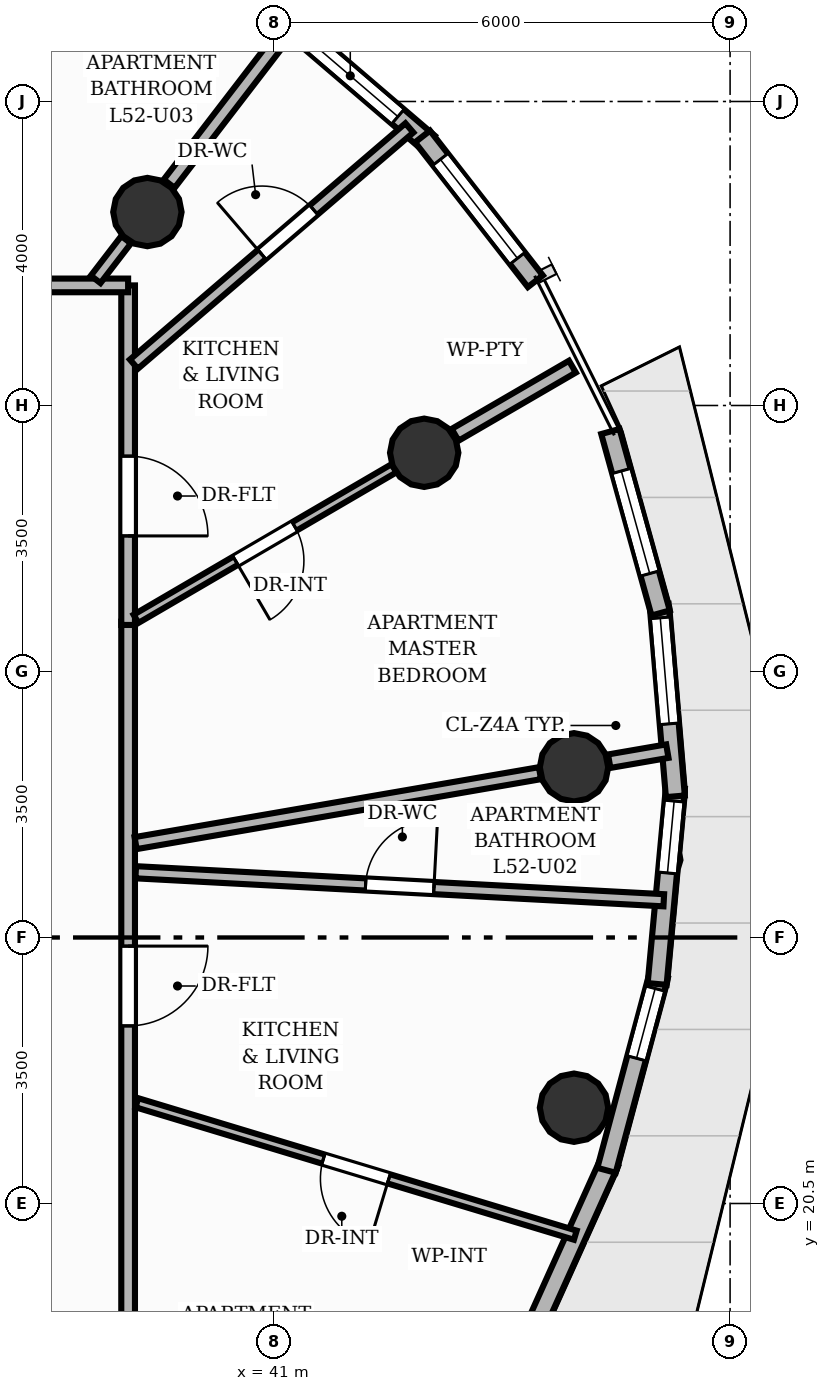
"""IFC4 building model, lengths in metres.
Left out: names, types, materials, properties, quantities, classifications, styles, units other than length and angle.
Written with IfcOpenShell. Run it as: python <this file> out.ifc"""

import sys

from ifc_helpers import new_model, si_unit, direction, frame, frame_2d, origin, origin_2d, place, context, subcontext, project, spatial, rectangle, circle, extrude, element, fill, save


model = new_model("IFC4")
c1 = context("Model", 3, precision=1e-05, world=origin(), true_north=direction((0.0, 1.0)))
c2 = subcontext(c1, "Body", "Model", "MODEL_VIEW")
j1 = project(units=[si_unit("LENGTHUNIT", "METRE"), si_unit("PLANEANGLEUNIT", "RADIAN")], contexts=[c1])
p1 = place(None, origin())
s1 = spatial("IfcSite", under=j1, at=p1, CompositionType="ELEMENT")
p2 = place(p1, origin())
s2 = spatial("IfcBuilding", under=s1, at=p2, CompositionType="ELEMENT")
p3 = place(p2, frame((0.0, 0.0, 175.84)))
s3 = spatial("IfcBuildingStorey", under=s2, at=p3, CompositionType="ELEMENT", Elevation=175.84)
for number, where, z_axis, x_axis in (
    (1, (44.946, 26.24, 0.0), (0.0, 0.0, 1.0), (1.0, 0.0, 0.0)),
    (2, (42.975, 30.378, 0.0), (0.0, 0.0, 1.0), (1.0, 0.0, 0.0)),
    (3, (39.333, 33.545, 0.0), (0.0, 0.0, 1.0), (1.0, 0.0, 0.0)),
    (4, (44.946, 21.76, 0.0), (0.0, 0.0, 1.0), (1.0, 0.0, 0.0)),
):
    element("IfcColumn", number, at=place(p3, frame(where, z_axis=z_axis, x_axis=x_axis)), inside=s3, PredefinedType="COLUMN", context=c2, shape_type="SweptSolid", body=[
        extrude(circle(Radius=0.45, at=origin_2d()), origin(), (0.0, 0.0, 1.0), 3.2),
    ])
p4 = place(p3, frame((41.198, 36.027, 0.0), z_axis=(0.0, 0.0, 1.0), x_axis=(0.759591927835, -0.65039995631, 0.0)))
e5 = element("IfcWall", 5, at=p4, inside=s3, PredefinedType="SOLIDWALL", context=c2, shape_type="SweptSolid", body=[
    extrude(rectangle(XDim=2.415, YDim=0.25, at=frame_2d((1.208, 0.0))), origin(), (0.0, 0.0, 1.0), 2.96),
])
p5 = place(p4, frame((0.234, 0.0, 0.85)))
e6 = element("IfcOpeningElement", 6, at=p5, cuts=e5, PredefinedType="OPENING", context=c2, shape_type="SweptSolid", body=[
    extrude(rectangle(XDim=1.65, YDim=1.52, at=frame_2d((0.825, 0.76))), frame((0.0, 0.135, 0.0), z_axis=(0.0, -1.0, 0.0), x_axis=(1.0, 0.0, 0.0)), (0.0, 0.0, 1.0), 0.27),
])
p6 = place(p3, frame((45.411, 21.04, 0.0), z_axis=(0.0, 0.0, 1.0), x_axis=(-0.410736648959, -0.911754026699, 0.0)))
e7 = element("IfcWall", 7, at=p6, inside=s3, PredefinedType="SOLIDWALL", context=c2, shape_type="SweptSolid", body=[
    extrude(rectangle(XDim=2.701, YDim=0.25, at=frame_2d((1.351, 0.0))), origin(), (0.0, 0.0, 1.0), 2.96),
])
p7 = place(p3, frame((46.06, 23.497, 0.0), z_axis=(0.0, 0.0, 1.0), x_axis=(-0.258688517816, -0.965960791518, 0.0)))
e8 = element("IfcWall", 8, at=p7, inside=s3, PredefinedType="SOLIDWALL", context=c2, shape_type="SweptSolid", body=[
    extrude(rectangle(XDim=2.651, YDim=0.25, at=frame_2d((1.326, 0.0))), origin(), (0.0, 0.0, 1.0), 2.96),
])
p8 = place(p7, frame((0.175, 0.0, 0.85)))
e9 = element("IfcOpeningElement", 9, at=p8, cuts=e8, PredefinedType="OPENING", context=c2, shape_type="SweptSolid", body=[
    extrude(rectangle(XDim=0.95, YDim=1.45, at=frame_2d((0.475, 0.725))), frame((0.0, 0.135, 0.0), z_axis=(0.0, -1.0, 0.0), x_axis=(1.0, 0.0, 0.0)), (0.0, 0.0, 1.0), 0.27),
])
p9 = place(p3, frame((46.28, 25.969, 0.0), z_axis=(0.0, 0.0, 1.0), x_axis=(-0.092582110032, -0.995705053167, 0.0)))
e10 = element("IfcWall", 10, at=p9, inside=s3, PredefinedType="SOLIDWALL", context=c2, shape_type="SweptSolid", body=[
    extrude(rectangle(XDim=2.592, YDim=0.25, at=frame_2d((1.296, 0.0))), origin(), (0.0, 0.0, 1.0), 2.96),
])
p10 = place(p9, frame((0.175, 0.0, 0.85)))
e11 = element("IfcOpeningElement", 11, at=p10, cuts=e10, PredefinedType="OPENING", context=c2, shape_type="SweptSolid", body=[
    extrude(rectangle(XDim=0.95, YDim=1.45, at=frame_2d((0.475, 0.725))), frame((0.0, 0.135, 0.0), z_axis=(0.0, -1.0, 0.0), x_axis=(1.0, 0.0, 0.0)), (0.0, 0.0, 1.0), 0.27),
])
p11 = place(p3, frame((46.066, 28.381, 0.0), z_axis=(0.0, 0.0, 1.0), x_axis=(0.084274320236, -0.996442591898, 0.0)))
e12 = element("IfcWall", 12, at=p11, inside=s3, PredefinedType="SOLIDWALL", context=c2, shape_type="SweptSolid", body=[
    extrude(rectangle(XDim=2.532, YDim=0.25, at=frame_2d((1.266, 0.0))), origin(), (0.0, 0.0, 1.0), 2.96),
])
p12 = place(p11, frame((0.175, 0.0, 0.85)))
e13 = element("IfcOpeningElement", 13, at=p12, cuts=e12, PredefinedType="OPENING", context=c2, shape_type="SweptSolid", body=[
    extrude(rectangle(XDim=1.4, YDim=1.55, at=frame_2d((0.7, 0.775))), frame((0.0, 0.135, 0.0), z_axis=(0.0, -1.0, 0.0), x_axis=(1.0, 0.0, 0.0)), (0.0, 0.0, 1.0), 0.27),
])
p13 = place(p3, frame((45.425, 30.658, 0.0), z_axis=(0.0, 0.0, 1.0), x_axis=(0.266734060973, -0.96377017007, 0.0)))
e14 = element("IfcWall", 14, at=p13, inside=s3, PredefinedType="SOLIDWALL", context=c2, shape_type="SweptSolid", body=[
    extrude(rectangle(XDim=2.478, YDim=0.25, at=frame_2d((1.239, 0.0))), origin(), (0.0, 0.0, 1.0), 2.96),
])
p14 = place(p13, frame((0.539, 0.0, 0.85)))
e15 = element("IfcOpeningElement", 15, at=p14, cuts=e14, PredefinedType="OPENING", context=c2, shape_type="SweptSolid", body=[
    extrude(rectangle(XDim=1.4, YDim=1.55, at=frame_2d((0.7, 0.775))), frame((0.0, 0.135, 0.0), z_axis=(0.0, -1.0, 0.0), x_axis=(1.0, 0.0, 0.0)), (0.0, 0.0, 1.0), 0.27),
])
p15 = place(p3, frame((42.953, 34.539, 0.0), z_axis=(0.0, 0.0, 1.0), x_axis=(0.61468225386, -0.788774826417, 0.0)))
e16 = element("IfcWall", 16, at=p15, inside=s3, PredefinedType="SOLIDWALL", context=c2, shape_type="SweptSolid", body=[
    extrude(rectangle(XDim=2.415, YDim=0.25, at=frame_2d((1.208, 0.0))), origin(), (0.0, 0.0, 1.0), 2.96),
])
p16 = place(p15, frame((0.382, 0.0, 0.85)))
e17 = element("IfcOpeningElement", 17, at=p16, cuts=e16, PredefinedType="OPENING", context=c2, shape_type="SweptSolid", body=[
    extrude(rectangle(XDim=1.65, YDim=1.55, at=frame_2d((0.825, 0.775))), frame((0.0, 0.135, 0.0), z_axis=(0.0, -1.0, 0.0), x_axis=(1.0, 0.0, 0.0)), (0.0, 0.0, 1.0), 0.27),
])
p17 = place(p3, frame((45.409, 26.32, 0.0), z_axis=(0.0, 0.0, 1.0), x_axis=(0.985363715758, 0.170465092225, 0.0)))
e18 = element("IfcWall", 18, at=p17, inside=s3, PredefinedType="PARTITIONING", context=c2, shape_type="SweptSolid", body=[
    extrude(rectangle(XDim=0.776, YDim=0.18, at=frame_2d((0.388, 0.0))), origin(), (0.0, 0.0, 1.0), 2.403),
])
p18 = place(p3, frame((43.382, 30.614, 0.0), z_axis=(0.0, 0.0, 1.0), x_axis=(0.86456661279, 0.502518230563, 0.0)))
e19 = element("IfcWall", 19, at=p18, inside=s3, PredefinedType="PARTITIONING", context=c2, shape_type="SweptSolid", body=[
    extrude(rectangle(XDim=1.785, YDim=0.18, at=frame_2d((0.893, 0.0))), origin(), (0.0, 0.0, 1.0), 2.403),
])
p19 = place(p3, frame((39.62, 33.918, 0.0), z_axis=(0.0, 0.0, 1.0), x_axis=(0.609164681512, 0.793043750873, 0.0)))
e20 = element("IfcWall", 20, at=p19, inside=s3, PredefinedType="PARTITIONING", context=c2, shape_type="SweptSolid", body=[
    extrude(rectangle(XDim=2.572, YDim=0.18, at=frame_2d((1.286, 0.0))), origin(), (0.0, 0.0, 1.0), 2.403),
])
p20 = place(p3, frame((39.08, 28.156, 0.0), z_axis=(0.0, 0.0, 1.0), x_axis=(0.0, -1.0, 0.0)))
e21 = element("IfcWall", 21, at=p20, inside=s3, PredefinedType="PARTITIONING", context=c2, shape_type="SweptSolid", body=[
    extrude(rectangle(XDim=12.736, YDim=0.18, at=frame_2d((6.368, 0.0))), origin(), (0.0, 0.0, 1.0), 2.955),
])
p21 = place(p20, frame((4.269, 0.0, 0.0)))
e22 = element("IfcOpeningElement", 22, at=p21, cuts=e21, PredefinedType="OPENING", context=c2, shape_type="SweptSolid", body=[
    extrude(rectangle(XDim=1.05, YDim=2.15, at=frame_2d((0.525, 1.075))), frame((0.0, 0.1, 0.0), z_axis=(0.0, -1.0, 0.0), x_axis=(1.0, 0.0, 0.0)), (0.0, 0.0, 1.0), 0.2),
])
p22 = place(p3, frame((39.08, 32.58, 0.0), z_axis=(0.0, 0.0, 1.0), x_axis=(0.0, -1.0, 0.0)))
e23 = element("IfcWall", 23, at=p22, inside=s3, PredefinedType="PARTITIONING", context=c2, shape_type="SweptSolid", body=[
    extrude(rectangle(XDim=4.468, YDim=0.18, at=frame_2d((2.234, 0.0))), origin(), (0.0, 0.0, 1.0), 2.955),
])
p23 = place(p22, frame((2.246, 0.0, 0.0)))
e24 = element("IfcOpeningElement", 24, at=p23, cuts=e23, PredefinedType="OPENING", context=c2, shape_type="SweptSolid", body=[
    extrude(rectangle(XDim=1.05, YDim=2.15, at=frame_2d((0.525, 1.075))), frame((0.0, 0.1, 0.0), z_axis=(0.0, -1.0, 0.0), x_axis=(1.0, 0.0, 0.0)), (0.0, 0.0, 1.0), 0.2),
])
p24 = place(p3, frame((33.2, 32.58, 0.0), z_axis=(0.0, 0.0, 1.0), x_axis=(1.0, 0.0, 0.0)))
e25 = element("IfcWall", 25, at=p24, inside=s3, PredefinedType="PARTITIONING", context=c2, shape_type="SweptSolid", body=[
    extrude(rectangle(XDim=5.88, YDim=0.18, at=frame_2d((2.94, 0.0))), origin(), (0.0, 0.0, 1.0), 2.955),
])
p25 = place(p24, frame((2.184, 0.0, 0.0)))
e26 = element("IfcOpeningElement", 26, at=p25, cuts=e25, PredefinedType="OPENING", context=c2, shape_type="SweptSolid", body=[
    extrude(rectangle(XDim=1.05, YDim=2.15, at=frame_2d((0.525, 1.075))), frame((0.0, 0.1, 0.0), z_axis=(0.0, -1.0, 0.0), x_axis=(1.0, 0.0, 0.0)), (0.0, 0.0, 1.0), 0.2),
])
p26 = place(p3, frame((39.18, 24.858, 0.0), z_axis=(0.0, 0.0, 1.0), x_axis=(0.998597105279, -0.05295112207, 0.0)))
e27 = element("IfcWall", 27, at=p26, inside=s3, PredefinedType="PLUMBINGWALL", context=c2, shape_type="SweptSolid", body=[
    extrude(rectangle(XDim=6.958, YDim=0.16, at=frame_2d((3.479, 0.0))), origin(), (0.0, 0.0, 1.0), 2.692),
])
p27 = place(p26, frame((3.029, 0.0, 0.0)))
e28 = element("IfcOpeningElement", 28, at=p27, cuts=e27, PredefinedType="OPENING", context=c2, shape_type="SweptSolid", body=[
    extrude(rectangle(XDim=0.9, YDim=2.1, at=frame_2d((0.45, 1.05))), frame((0.0, 0.09, 0.0), z_axis=(0.0, -1.0, 0.0), x_axis=(1.0, 0.0, 0.0)), (0.0, 0.0, 1.0), 0.18),
])
p28 = place(p3, frame((44.963, 20.083, 0.0), z_axis=(0.0, 0.0, 1.0), x_axis=(-0.95726021897, 0.289228064298, 0.0)))
e29 = element("IfcWall", 29, at=p28, inside=s3, PredefinedType="PARTITIONING", context=c2, shape_type="SweptSolid", body=[
    extrude(rectangle(XDim=6.026, YDim=0.125, at=frame_2d((3.013, 0.0))), origin(), (0.0, 0.0, 1.0), 2.692),
])
p29 = place(p28, frame((2.563, 0.0, 0.0)))
e30 = element("IfcOpeningElement", 30, at=p29, cuts=e29, PredefinedType="OPENING", context=c2, shape_type="SweptSolid", body=[
    extrude(rectangle(XDim=0.9, YDim=2.1, at=frame_2d((0.45, 1.05))), frame((0.0, 0.073, 0.0), z_axis=(0.0, -1.0, 0.0), x_axis=(1.0, 0.0, 0.0)), (0.0, 0.0, 1.0), 0.145),
])
p30 = place(p3, frame((39.178, 25.242, 0.0), z_axis=(0.0, 0.0, 1.0), x_axis=(0.985362047777, 0.170474733611, 0.0)))
e31 = element("IfcWall", 31, at=p30, inside=s3, PredefinedType="PLUMBINGWALL", context=c2, shape_type="SweptSolid", body=[
    extrude(rectangle(XDim=5.399, YDim=0.16, at=frame_2d((2.7, 0.0))), origin(), (0.0, 0.0, 1.0), 2.403),
])
p31 = place(p3, frame((39.156, 31.544, 0.0), z_axis=(0.0, 0.0, 1.0), x_axis=(0.759083333315, 0.650993466238, 0.0)))
e32 = element("IfcWall", 32, at=p31, inside=s3, PredefinedType="PLUMBINGWALL", context=c2, shape_type="SweptSolid", body=[
    extrude(rectangle(XDim=4.775, YDim=0.16, at=frame_2d((2.387, 0.0))), origin(), (0.0, 0.0, 1.0), 2.955),
])
p32 = place(p31, frame((2.217, 0.0, 0.0)))
e33 = element("IfcOpeningElement", 33, at=p32, cuts=e32, PredefinedType="OPENING", context=c2, shape_type="SweptSolid", body=[
    extrude(rectangle(XDim=0.9, YDim=2.1, at=frame_2d((0.45, 1.05))), frame((0.0, 0.09, 0.0), z_axis=(0.0, -1.0, 0.0), x_axis=(1.0, 0.0, 0.0)), (0.0, 0.0, 1.0), 0.18),
])
p33 = place(p3, frame((42.58, 30.175, 0.0), z_axis=(0.0, 0.0, 1.0), x_axis=(-0.863675291667, -0.504048599407, 0.0)))
e34 = element("IfcWall", 34, at=p33, inside=s3, PredefinedType="PARTITIONING", context=c2, shape_type="SweptSolid", body=[
    extrude(rectangle(XDim=3.932, YDim=0.125, at=frame_2d((1.966, 0.0))), origin(), (0.0, 0.0, 1.0), 2.403),
])
p34 = place(p33, frame((1.516, 0.0, 0.0)))
e35 = element("IfcOpeningElement", 35, at=p34, cuts=e34, PredefinedType="OPENING", context=c2, shape_type="SweptSolid", body=[
    extrude(rectangle(XDim=0.9, YDim=2.1, at=frame_2d((0.45, 1.05))), frame((0.0, 0.073, 0.0), z_axis=(0.0, -1.0, 0.0), x_axis=(1.0, 0.0, 0.0)), (0.0, 0.0, 1.0), 0.145),
])
p35 = place(p3, frame((38.653, 32.659, 0.0), z_axis=(0.0, 0.0, 1.0), x_axis=(0.609101063055, 0.79309261438, 0.0)))
e36 = element("IfcWall", 36, at=p35, inside=s3, PredefinedType="PLUMBINGWALL", context=c2, shape_type="SweptSolid", body=[
    extrude(rectangle(XDim=0.658, YDim=0.16, at=frame_2d((0.329, 0.0))), origin(), (0.0, 0.0, 1.0), 2.403),
])
p36 = place(p5, origin())
e37 = element("IfcWindow", 37, at=p36, inside=s3, PartitioningType="SINGLE_PANEL", PredefinedType="WINDOW", context=c2, shape_type="SweptSolid", body=[
    extrude(rectangle(XDim=1.65, YDim=1.52, at=frame_2d((0.825, 0.76))), frame((0.0, 0.03, 0.0), z_axis=(0.0, -1.0, 0.0), x_axis=(1.0, 0.0, 0.0)), (0.0, 0.0, 1.0), 0.06),
])
fill(e6, e37)
p37 = place(p8, origin())
e38 = element("IfcWindow", 38, at=p37, inside=s3, PartitioningType="SINGLE_PANEL", PredefinedType="WINDOW", context=c2, shape_type="SweptSolid", body=[
    extrude(rectangle(XDim=0.95, YDim=1.45, at=frame_2d((0.475, 0.725))), frame((0.0, 0.03, 0.0), z_axis=(0.0, -1.0, 0.0), x_axis=(1.0, 0.0, 0.0)), (0.0, 0.0, 1.0), 0.06),
])
fill(e9, e38)
p38 = place(p10, origin())
e39 = element("IfcWindow", 39, at=p38, inside=s3, PartitioningType="SINGLE_PANEL", PredefinedType="WINDOW", context=c2, shape_type="SweptSolid", body=[
    extrude(rectangle(XDim=0.95, YDim=1.45, at=frame_2d((0.475, 0.725))), frame((0.0, 0.03, 0.0), z_axis=(0.0, -1.0, 0.0), x_axis=(1.0, 0.0, 0.0)), (0.0, 0.0, 1.0), 0.06),
])
fill(e11, e39)
p39 = place(p12, origin())
e40 = element("IfcWindow", 40, at=p39, inside=s3, PartitioningType="SINGLE_PANEL", PredefinedType="WINDOW", context=c2, shape_type="SweptSolid", body=[
    extrude(rectangle(XDim=1.4, YDim=1.55, at=frame_2d((0.7, 0.775))), frame((0.0, 0.03, 0.0), z_axis=(0.0, -1.0, 0.0), x_axis=(1.0, 0.0, 0.0)), (0.0, 0.0, 1.0), 0.06),
])
fill(e13, e40)
p40 = place(p14, origin())
e41 = element("IfcWindow", 41, at=p40, inside=s3, PartitioningType="SINGLE_PANEL", PredefinedType="WINDOW", context=c2, shape_type="SweptSolid", body=[
    extrude(rectangle(XDim=1.4, YDim=1.55, at=frame_2d((0.7, 0.775))), frame((0.0, 0.03, 0.0), z_axis=(0.0, -1.0, 0.0), x_axis=(1.0, 0.0, 0.0)), (0.0, 0.0, 1.0), 0.06),
])
fill(e15, e41)
p41 = place(p16, origin())
e42 = element("IfcWindow", 42, at=p41, inside=s3, PartitioningType="SINGLE_PANEL", PredefinedType="WINDOW", context=c2, shape_type="SweptSolid", body=[
    extrude(rectangle(XDim=1.65, YDim=1.55, at=frame_2d((0.825, 0.775))), frame((0.0, 0.03, 0.0), z_axis=(0.0, -1.0, 0.0), x_axis=(1.0, 0.0, 0.0)), (0.0, 0.0, 1.0), 0.06),
])
fill(e17, e42)
p42 = place(p21, origin())
e43 = element("IfcDoor", 43, at=p42, inside=s3, OperationType="SINGLE_SWING_LEFT", PredefinedType="DOOR", context=c2, shape_type="SweptSolid", body=[
    extrude(rectangle(XDim=1.05, YDim=2.15, at=frame_2d((0.525, 1.075))), frame((0.0, 0.025, 0.0), z_axis=(0.0, -1.0, 0.0), x_axis=(1.0, 0.0, 0.0)), (0.0, 0.0, 1.0), 0.05),
])
fill(e22, e43)
p43 = place(p27, origin())
e44 = element("IfcDoor", 44, at=p43, inside=s3, OperationType="SINGLE_SWING_RIGHT", PredefinedType="DOOR", context=c2, shape_type="SweptSolid", body=[
    extrude(rectangle(XDim=0.9, YDim=2.1, at=frame_2d((0.45, 1.05))), frame((0.0, 0.025, 0.0), z_axis=(0.0, -1.0, 0.0), x_axis=(1.0, 0.0, 0.0)), (0.0, 0.0, 1.0), 0.05),
])
fill(e28, e44)
p44 = place(p29, origin())
e45 = element("IfcDoor", 45, at=p44, inside=s3, OperationType="SINGLE_SWING_LEFT", PredefinedType="DOOR", context=c2, shape_type="SweptSolid", body=[
    extrude(rectangle(XDim=0.9, YDim=2.1, at=frame_2d((0.45, 1.05))), frame((0.0, 0.025, 0.0), z_axis=(0.0, -1.0, 0.0), x_axis=(1.0, 0.0, 0.0)), (0.0, 0.0, 1.0), 0.05),
])
fill(e30, e45)
p45 = place(p23, origin())
e46 = element("IfcDoor", 46, at=p45, inside=s3, OperationType="SINGLE_SWING_RIGHT", PredefinedType="DOOR", context=c2, shape_type="SweptSolid", body=[
    extrude(rectangle(XDim=1.05, YDim=2.15, at=frame_2d((0.525, 1.075))), frame((0.0, 0.025, 0.0), z_axis=(0.0, -1.0, 0.0), x_axis=(1.0, 0.0, 0.0)), (0.0, 0.0, 1.0), 0.05),
])
fill(e24, e46)
p46 = place(p32, origin())
e47 = element("IfcDoor", 47, at=p46, inside=s3, OperationType="SINGLE_SWING_LEFT", PredefinedType="DOOR", context=c2, shape_type="SweptSolid", body=[
    extrude(rectangle(XDim=0.9, YDim=2.1, at=frame_2d((0.45, 1.05))), frame((0.0, 0.025, 0.0), z_axis=(0.0, -1.0, 0.0), x_axis=(1.0, 0.0, 0.0)), (0.0, 0.0, 1.0), 0.05),
])
fill(e33, e47)
p47 = place(p34, origin())
e48 = element("IfcDoor", 48, at=p47, inside=s3, OperationType="SINGLE_SWING_RIGHT", PredefinedType="DOOR", context=c2, shape_type="SweptSolid", body=[
    extrude(rectangle(XDim=0.9, YDim=2.1, at=frame_2d((0.45, 1.05))), frame((0.0, 0.025, 0.0), z_axis=(0.0, -1.0, 0.0), x_axis=(1.0, 0.0, 0.0)), (0.0, 0.0, 1.0), 0.05),
])
fill(e35, e48)
save(model, sys.argv[1])
